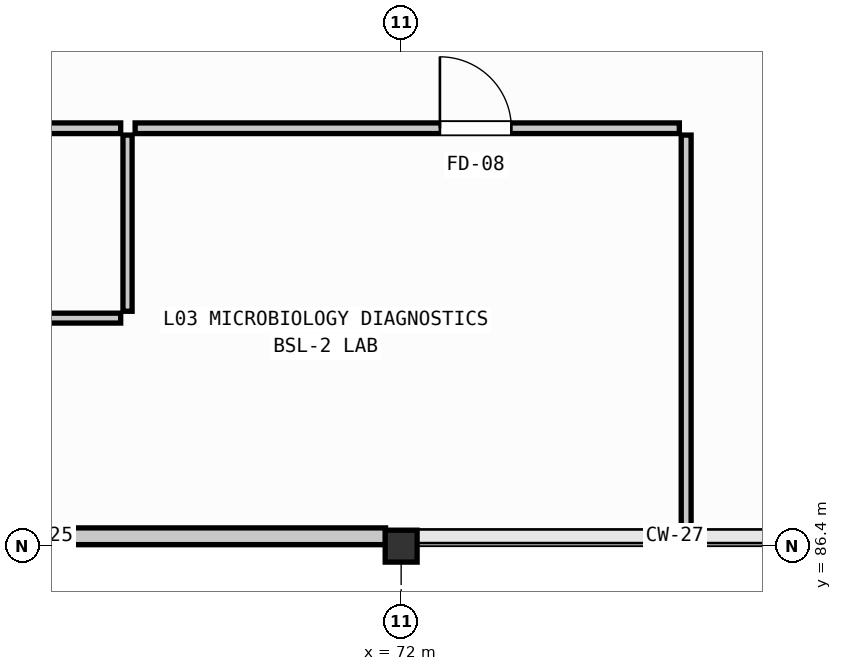
"""IFC4 building model, lengths in metres.
Left out: names, types, materials, properties, quantities, classifications, styles, units other than length and angle.
Written with IfcOpenShell. Run it as: python <this file> out.ifc"""

import sys

from ifc_helpers import new_model, si_unit, direction, frame, frame_2d, origin, origin_2d, place, context, subcontext, project, spatial, rectangle, extrude, element, fill, save


model = new_model("IFC4")
c1 = context("Model", 3, precision=1e-05, world=origin(), true_north=direction((0.0, 1.0)))
c2 = subcontext(c1, "Body", "Model", "MODEL_VIEW")
j1 = project(units=[si_unit("LENGTHUNIT", "METRE"), si_unit("PLANEANGLEUNIT", "RADIAN")], contexts=[c1])
p1 = place(None, origin())
s1 = spatial("IfcSite", under=j1, at=p1, CompositionType="ELEMENT")
p2 = place(p1, origin())
s2 = spatial("IfcBuilding", under=s1, at=p2, CompositionType="ELEMENT")
p3 = place(p2, frame((0.0, 0.0, 9.3)))
s3 = spatial("IfcBuildingStorey", under=s2, at=p3, CompositionType="ELEMENT", Elevation=9.3)
p4 = place(p3, frame((72.0, 86.4, 0.0), z_axis=(0.0, 0.0, 1.0), x_axis=(1.0, 0.0, 0.0)))
e1 = element("IfcColumn", 1, at=p4, inside=s3, PredefinedType="COLUMN", context=c2, shape_type="SweptSolid", body=[
    extrude(rectangle(XDim=0.42, YDim=0.42, at=origin_2d()), origin(), (0.0, 0.0, 1.0), 3.99),
])
p5 = place(p3, frame((71.795, 86.53, 0.0), z_axis=(0.0, 0.0, 1.0), x_axis=(-1.0, 0.0, 0.0)))
e2 = element("IfcWall", 2, at=p5, inside=s3, PredefinedType="SOLIDWALL", context=c2, shape_type="SweptSolid", body=[
    extrude(rectangle(XDim=6.79, YDim=0.22, at=frame_2d((3.395, 0.0))), origin(), (0.0, 0.0, 1.0), 3.27),
])
p6 = place(p5, frame((4.12, 0.0, 0.95)))
e3 = element("IfcOpeningElement", 3, at=p6, cuts=e2, PredefinedType="OPENING", context=c2, shape_type="SweptSolid", body=[
    extrude(rectangle(XDim=0.75, YDim=1.25, at=frame_2d((0.375, 0.625))), frame((0.0, 0.12, 0.0), z_axis=(0.0, -1.0, 0.0), x_axis=(1.0, 0.0, 0.0)), (0.0, 0.0, 1.0), 0.24),
])
p7 = place(p3, frame((68.31, 89.4, 0.0), z_axis=(0.0, 0.0, 1.0), x_axis=(-1.0, 0.0, 0.0)))
e4 = element("IfcWall", 4, at=p7, inside=s3, PredefinedType="PARTITIONING", context=c2, shape_type="SweptSolid", body=[
    extrude(rectangle(XDim=3.441, YDim=0.13, at=frame_2d((1.72, 0.0))), origin(), (0.0, 0.0, 1.0), 3.35),
])
p8 = place(p3, frame((46.892, 91.898, 0.0), z_axis=(0.0, 0.0, 1.0), x_axis=(1.0, 0.0, 0.0)))
e5 = element("IfcWall", 5, at=p8, inside=s3, PredefinedType="PARTITIONING", context=c2, shape_type="SweptSolid", body=[
    extrude(rectangle(XDim=21.418, YDim=0.14, at=frame_2d((10.709, 0.0))), origin(), (0.0, 0.0, 1.0), 3.35),
])
p9 = place(p8, frame((11.539, 0.0, 0.0)))
e6 = element("IfcOpeningElement", 6, at=p9, cuts=e5, PredefinedType="OPENING", context=c2, shape_type="SweptSolid", body=[
    extrude(rectangle(XDim=1.04, YDim=2.12, at=frame_2d((0.52, 1.06))), frame((0.0, 0.08, 0.0), z_axis=(0.0, -1.0, 0.0), x_axis=(1.0, 0.0, 0.0)), (0.0, 0.0, 1.0), 0.16),
])
p10 = place(p3, frame((68.4, 91.808, 0.0), z_axis=(0.0, 0.0, 1.0), x_axis=(0.0, -1.0, 0.0)))
e7 = element("IfcWall", 7, at=p10, inside=s3, PredefinedType="PARTITIONING", context=c2, shape_type="SweptSolid", body=[
    extrude(rectangle(XDim=2.318, YDim=0.12, at=frame_2d((1.159, 0.0))), origin(), (0.0, 0.0, 1.0), 3.97),
])
p11 = place(p3, frame((68.5, 91.898, 0.0), z_axis=(0.0, 0.0, 1.0), x_axis=(1.0, 0.0, 0.0)))
e8 = element("IfcWall", 8, at=p11, inside=s3, PredefinedType="PARTITIONING", context=c2, shape_type="SweptSolid", body=[
    extrude(rectangle(XDim=7.16, YDim=0.14, at=frame_2d((3.58, 0.0))), origin(), (0.0, 0.0, 1.0), 3.35),
])
p12 = place(p11, frame((4.01, 0.0, 0.0)))
e9 = element("IfcOpeningElement", 9, at=p12, cuts=e8, PredefinedType="OPENING", context=c2, shape_type="SweptSolid", body=[
    extrude(rectangle(XDim=0.94, YDim=2.1, at=frame_2d((0.47, 1.05))), frame((0.0, 0.08, 0.0), z_axis=(0.0, -1.0, 0.0), x_axis=(1.0, 0.0, 0.0)), (0.0, 0.0, 1.0), 0.16),
])
p13 = place(p3, frame((75.75, 91.808, 0.0), z_axis=(0.0, 0.0, 1.0), x_axis=(0.0, -1.0, 0.0)))
e10 = element("IfcWall", 10, at=p13, inside=s3, PredefinedType="PARTITIONING", context=c2, shape_type="SweptSolid", body=[
    extrude(rectangle(XDim=5.178, YDim=0.13, at=frame_2d((2.589, 0.0))), origin(), (0.0, 0.0, 1.0), 3.27),
])
p14 = place(p6, origin())
e11 = element("IfcWindow", 11, at=p14, inside=s3, PartitioningType="SINGLE_PANEL", PredefinedType="WINDOW", context=c2, shape_type="SweptSolid", body=[
    extrude(rectangle(XDim=0.75, YDim=1.25, at=frame_2d((0.375, 0.625))), frame((0.0, 0.03, 0.0), z_axis=(0.0, -1.0, 0.0), x_axis=(1.0, 0.0, 0.0)), (0.0, 0.0, 1.0), 0.06),
])
fill(e3, e11)
p15 = place(p12, origin())
e12 = element("IfcDoor", 12, at=p15, inside=s3, OperationType="SINGLE_SWING_LEFT", PredefinedType="DOOR", context=c2, shape_type="SweptSolid", body=[
    extrude(rectangle(XDim=0.94, YDim=2.1, at=frame_2d((0.47, 1.05))), frame((0.0, 0.025, 0.0), z_axis=(0.0, -1.0, 0.0), x_axis=(1.0, 0.0, 0.0)), (0.0, 0.0, 1.0), 0.05),
])
fill(e9, e12)
save(model, sys.argv[1])
